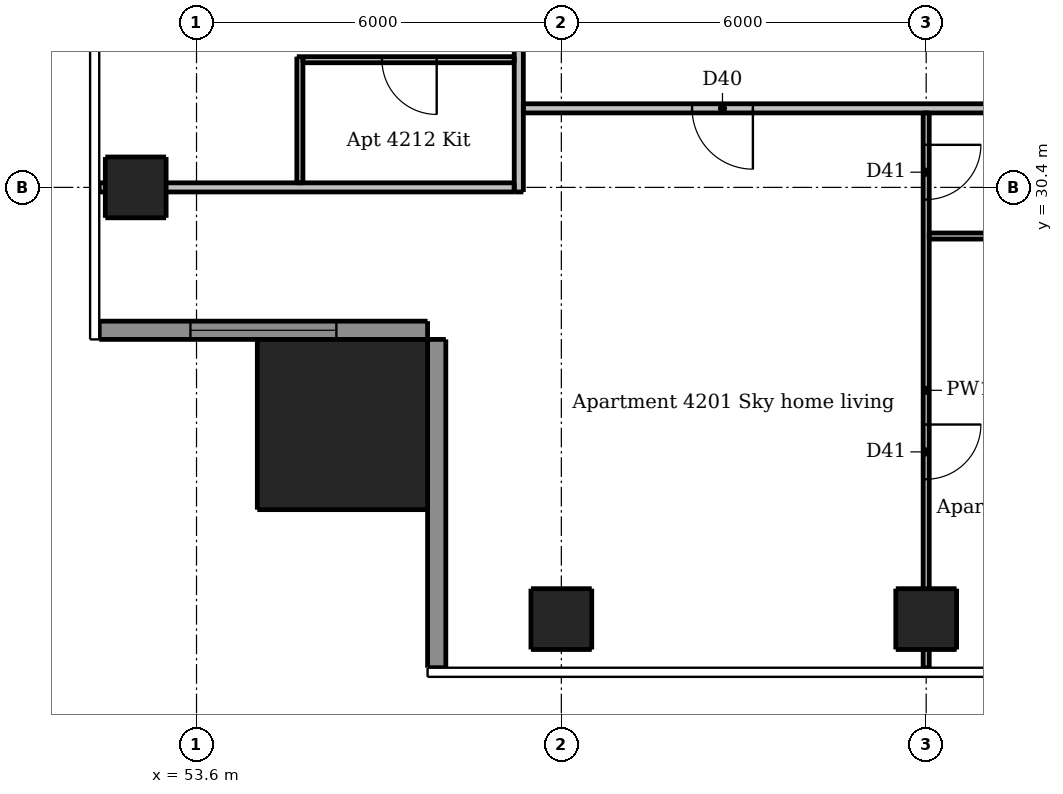
"""IFC4 building model, lengths in metres.
Left out: names, types, materials, properties, quantities, classifications, styles, units other than length and angle.
Written with IfcOpenShell. Run it as: python <this file> out.ifc"""

import sys

from ifc_helpers import new_model, si_unit, direction, frame, frame_2d, origin, origin_2d, place, context, subcontext, project, spatial, rectangle, extrude, element, fill, save


model = new_model("IFC4")
c1 = context("Model", 3, precision=1e-05, world=origin(), true_north=direction((0.0, 1.0)))
c2 = subcontext(c1, "Body", "Model", "MODEL_VIEW")
j1 = project(units=[si_unit("LENGTHUNIT", "METRE"), si_unit("PLANEANGLEUNIT", "RADIAN")], contexts=[c1])
p1 = place(None, origin())
s1 = spatial("IfcSite", under=j1, at=p1, CompositionType="ELEMENT")
p2 = place(p1, origin())
s2 = spatial("IfcBuilding", under=s1, at=p2, CompositionType="ELEMENT")
p3 = place(p2, frame((0.0, 0.0, 158.2)))
s3 = spatial("IfcBuildingStorey", under=s2, at=p3, CompositionType="ELEMENT", Elevation=158.2)
for number, where, z_axis, x_axis in (
    (1, (59.6, 23.3, 0.0), (0.0, 0.0, 1.0), (1.0, 0.0, 0.0)),
    (2, (65.6, 23.3, 0.0), (0.0, 0.0, 1.0), (1.0, 0.0, 0.0)),
    (3, (52.6, 30.4, 0.0), (0.0, 0.0, 1.0), (1.0, 0.0, 0.0)),
):
    element("IfcColumn", number, at=place(p3, frame(where, z_axis=z_axis, x_axis=x_axis)), inside=s3, PredefinedType="COLUMN", context=c2, shape_type="SweptSolid", body=[
        extrude(rectangle(XDim=1.0, YDim=1.0, at=origin_2d()), origin(), (0.0, 0.0, 1.0), 3.05),
    ])
p4 = place(p3, frame((56.0, 26.5, 0.0), z_axis=(0.0, 0.0, 1.0), x_axis=(1.0, 0.0, 0.0)))
e4 = element("IfcColumn", 4, at=p4, inside=s3, PredefinedType="COLUMN", context=c2, shape_type="SweptSolid", body=[
    extrude(rectangle(XDim=2.8, YDim=2.8, at=origin_2d()), origin(), (0.0, 0.0, 1.0), 3.3),
])
p5 = place(p3, frame((52.0, 28.05, 0.0), z_axis=(0.0, 0.0, 1.0), x_axis=(1.0, 0.0, 0.0)))
e5 = element("IfcWall", 5, at=p5, inside=s3, PredefinedType="SOLIDWALL", context=c2, shape_type="SweptSolid", body=[
    extrude(rectangle(XDim=5.4, YDim=0.3, at=frame_2d((2.7, 0.0))), origin(), (0.0, 0.0, 1.0), 3.05),
])
p6 = place(p5, frame((1.5, 0.0, 0.15)))
e6 = element("IfcOpeningElement", 6, at=p6, cuts=e5, PredefinedType="OPENING", context=c2, shape_type="SweptSolid", body=[
    extrude(rectangle(XDim=2.4, YDim=2.1, at=frame_2d((1.2, 1.05))), frame((0.0, 0.16, 0.0), z_axis=(0.0, -1.0, 0.0), x_axis=(1.0, 0.0, 0.0)), (0.0, 0.0, 1.0), 0.32),
])
p7 = place(p3, frame((57.55, 27.9, 0.0), z_axis=(0.0, 0.0, 1.0), x_axis=(0.0, -1.0, 0.0)))
e7 = element("IfcWall", 7, at=p7, inside=s3, PredefinedType="SOLIDWALL", context=c2, shape_type="SweptSolid", body=[
    extrude(rectangle(XDim=5.4, YDim=0.3, at=frame_2d((2.7, 0.0))), origin(), (0.0, 0.0, 1.0), 3.05),
])
p8 = place(p3, frame((55.3, 30.475, 0.0), z_axis=(0.0, 0.0, 1.0), x_axis=(0.0, 1.0, 0.0)))
e8 = element("IfcWall", 8, at=p8, inside=s3, PredefinedType="PARTITIONING", context=c2, shape_type="SweptSolid", body=[
    extrude(rectangle(XDim=2.075, YDim=0.1, at=frame_2d((1.038, 0.0))), origin(), (0.0, 0.0, 1.0), 3.05),
])
p9 = place(p3, frame((65.6, 31.625, 0.0), z_axis=(0.0, 0.0, 1.0), x_axis=(0.0, -1.0, 0.0)))
e9 = element("IfcWall", 9, at=p9, inside=s3, PredefinedType="PARTITIONING", context=c2, shape_type="SweptSolid", body=[
    extrude(rectangle(XDim=9.125, YDim=0.1, at=frame_2d((4.562, 0.0))), origin(), (0.0, 0.0, 1.0), 2.516),
])
p10 = place(p9, frame((0.525, 0.0, 0.0)))
e10 = element("IfcOpeningElement", 10, at=p10, cuts=e9, PredefinedType="OPENING", context=c2, shape_type="SweptSolid", body=[
    extrude(rectangle(XDim=0.9, YDim=2.1, at=frame_2d((0.45, 1.05))), frame((0.0, 0.06, 0.0), z_axis=(0.0, -1.0, 0.0), x_axis=(1.0, 0.0, 0.0)), (0.0, 0.0, 1.0), 0.12),
])
p11 = place(p9, frame((5.125, 0.0, 0.0)))
e11 = element("IfcOpeningElement", 11, at=p11, cuts=e9, PredefinedType="OPENING", context=c2, shape_type="SweptSolid", body=[
    extrude(rectangle(XDim=0.9, YDim=2.1, at=frame_2d((0.45, 1.05))), frame((0.0, 0.06, 0.0), z_axis=(0.0, -1.0, 0.0), x_axis=(1.0, 0.0, 0.0)), (0.0, 0.0, 1.0), 0.12),
])
p12 = place(p3, frame((58.825, 32.5, 0.0), z_axis=(0.0, 0.0, 1.0), x_axis=(-1.0, 0.0, 0.0)))
e12 = element("IfcWall", 12, at=p12, inside=s3, PredefinedType="PARTITIONING", context=c2, shape_type="SweptSolid", body=[
    extrude(rectangle(XDim=3.475, YDim=0.1, at=frame_2d((1.737, 0.0))), origin(), (0.0, 0.0, 1.0), 3.05),
])
p13 = place(p12, frame((1.275, 0.0, 0.0)))
e13 = element("IfcOpeningElement", 13, at=p13, cuts=e12, PredefinedType="OPENING", context=c2, shape_type="SweptSolid", body=[
    extrude(rectangle(XDim=0.9, YDim=2.1, at=frame_2d((0.45, 1.05))), frame((0.0, 0.06, 0.0), z_axis=(0.0, -1.0, 0.0), x_axis=(1.0, 0.0, 0.0)), (0.0, 0.0, 1.0), 0.12),
])
p14 = place(p3, frame((65.65, 29.6, 0.0), z_axis=(0.0, 0.0, 1.0), x_axis=(1.0, 0.0, 0.0)))
e14 = element("IfcWall", 14, at=p14, inside=s3, PredefinedType="PARTITIONING", context=c2, shape_type="SweptSolid", body=[
    extrude(rectangle(XDim=5.875, YDim=0.1, at=frame_2d((2.938, 0.0))), origin(), (0.0, 0.0, 1.0), 3.05),
])
p15 = place(p14, frame((3.75, 0.0, 0.0)))
e15 = element("IfcOpeningElement", 15, at=p15, cuts=e14, PredefinedType="OPENING", context=c2, shape_type="SweptSolid", body=[
    extrude(rectangle(XDim=0.8, YDim=2.1, at=frame_2d((0.4, 1.05))), frame((0.0, 0.06, 0.0), z_axis=(0.0, -1.0, 0.0), x_axis=(1.0, 0.0, 0.0)), (0.0, 0.0, 1.0), 0.12),
])
p16 = place(p3, frame((58.9, 30.325, 0.0), z_axis=(0.0, 0.0, 1.0), x_axis=(0.0, 1.0, 0.0)))
e16 = element("IfcWall", 16, at=p16, inside=s3, PredefinedType="PARTITIONING", context=c2, shape_type="SweptSolid", body=[
    extrude(rectangle(XDim=30.85, YDim=0.15, at=frame_2d((15.425, 0.0))), origin(), (0.0, 0.0, 1.0), 3.05),
])
p17 = place(p16, frame((2.575, 0.0, 0.0)))
e17 = element("IfcOpeningElement", 17, at=p17, cuts=e16, PredefinedType="OPENING", context=c2, shape_type="SweptSolid", body=[
    extrude(rectangle(XDim=1.0, YDim=2.1, at=frame_2d((0.5, 1.05))), frame((0.0, 0.085, 0.0), z_axis=(0.0, -1.0, 0.0), x_axis=(1.0, 0.0, 0.0)), (0.0, 0.0, 1.0), 0.17),
])
p18 = place(p16, frame((8.575, 0.0, 0.0)))
e18 = element("IfcOpeningElement", 18, at=p18, cuts=e16, PredefinedType="OPENING", context=c2, shape_type="SweptSolid", body=[
    extrude(rectangle(XDim=1.0, YDim=2.1, at=frame_2d((0.5, 1.05))), frame((0.0, 0.085, 0.0), z_axis=(0.0, -1.0, 0.0), x_axis=(1.0, 0.0, 0.0)), (0.0, 0.0, 1.0), 0.17),
])
p19 = place(p16, frame((14.575, 0.0, 0.0)))
e19 = element("IfcOpeningElement", 19, at=p19, cuts=e16, PredefinedType="OPENING", context=c2, shape_type="SweptSolid", body=[
    extrude(rectangle(XDim=1.0, YDim=2.1, at=frame_2d((0.5, 1.05))), frame((0.0, 0.085, 0.0), z_axis=(0.0, -1.0, 0.0), x_axis=(1.0, 0.0, 0.0)), (0.0, 0.0, 1.0), 0.17),
])
p20 = place(p16, frame((26.925, 0.0, 0.0)))
e20 = element("IfcOpeningElement", 20, at=p20, cuts=e16, PredefinedType="OPENING", context=c2, shape_type="SweptSolid", body=[
    extrude(rectangle(XDim=1.0, YDim=2.1, at=frame_2d((0.5, 1.05))), frame((0.0, 0.085, 0.0), z_axis=(0.0, -1.0, 0.0), x_axis=(1.0, 0.0, 0.0)), (0.0, 0.0, 1.0), 0.17),
])
p21 = place(p3, frame((89.525, 31.7, 0.0), z_axis=(0.0, 0.0, 1.0), x_axis=(-1.0, 0.0, 0.0)))
e21 = element("IfcWall", 21, at=p21, inside=s3, PredefinedType="PARTITIONING", context=c2, shape_type="SweptSolid", body=[
    extrude(rectangle(XDim=30.55, YDim=0.15, at=frame_2d((15.275, 0.0))), origin(), (0.0, 0.0, 1.0), 3.05),
])
p22 = place(p21, frame((26.775, 0.0, 0.0)))
e22 = element("IfcOpeningElement", 22, at=p22, cuts=e21, PredefinedType="OPENING", context=c2, shape_type="SweptSolid", body=[
    extrude(rectangle(XDim=1.0, YDim=2.1, at=frame_2d((0.5, 1.05))), frame((0.0, 0.085, 0.0), z_axis=(0.0, -1.0, 0.0), x_axis=(1.0, 0.0, 0.0)), (0.0, 0.0, 1.0), 0.17),
])
p23 = place(p21, frame((14.425, 0.0, 0.0)))
e23 = element("IfcOpeningElement", 23, at=p23, cuts=e21, PredefinedType="OPENING", context=c2, shape_type="SweptSolid", body=[
    extrude(rectangle(XDim=1.0, YDim=2.1, at=frame_2d((0.5, 1.05))), frame((0.0, 0.085, 0.0), z_axis=(0.0, -1.0, 0.0), x_axis=(1.0, 0.0, 0.0)), (0.0, 0.0, 1.0), 0.17),
])
p24 = place(p21, frame((6.575, 0.0, 0.0)))
e24 = element("IfcOpeningElement", 24, at=p24, cuts=e21, PredefinedType="OPENING", context=c2, shape_type="SweptSolid", body=[
    extrude(rectangle(XDim=1.0, YDim=2.1, at=frame_2d((0.5, 1.05))), frame((0.0, 0.085, 0.0), z_axis=(0.0, -1.0, 0.0), x_axis=(1.0, 0.0, 0.0)), (0.0, 0.0, 1.0), 0.17),
])
p25 = place(p3, frame((52.0, 30.4, 0.0), z_axis=(0.0, 0.0, 1.0), x_axis=(1.0, 0.0, 0.0)))
e25 = element("IfcWall", 25, at=p25, inside=s3, PredefinedType="PARTITIONING", context=c2, shape_type="SweptSolid", body=[
    extrude(rectangle(XDim=6.825, YDim=0.15, at=frame_2d((3.413, 0.0))), origin(), (0.0, 0.0, 1.0), 2.647),
])
p26 = place(p6, origin())
e26 = element("IfcWindow", 26, at=p26, inside=s3, PartitioningType="DOUBLE_PANEL_VERTICAL", PredefinedType="WINDOW", context=c2, shape_type="SweptSolid", body=[
    extrude(rectangle(XDim=2.4, YDim=2.1, at=frame_2d((1.2, 1.05))), frame((0.0, 0.03, 0.0), z_axis=(0.0, -1.0, 0.0), x_axis=(1.0, 0.0, 0.0)), (0.0, 0.0, 1.0), 0.06),
])
fill(e6, e26)
p27 = place(p22, origin())
e27 = element("IfcDoor", 27, at=p27, inside=s3, OperationType="SINGLE_SWING_LEFT", PredefinedType="DOOR", context=c2, shape_type="SweptSolid", body=[
    extrude(rectangle(XDim=1.0, YDim=2.1, at=frame_2d((0.5, 1.05))), frame((0.0, 0.025, 0.0), z_axis=(0.0, -1.0, 0.0), x_axis=(1.0, 0.0, 0.0)), (0.0, 0.0, 1.0), 0.05),
])
fill(e22, e27)
p28 = place(p10, origin())
e28 = element("IfcDoor", 28, at=p28, inside=s3, OperationType="SINGLE_SWING_LEFT", PredefinedType="DOOR", context=c2, shape_type="SweptSolid", body=[
    extrude(rectangle(XDim=0.9, YDim=2.1, at=frame_2d((0.45, 1.05))), frame((0.0, 0.025, 0.0), z_axis=(0.0, -1.0, 0.0), x_axis=(1.0, 0.0, 0.0)), (0.0, 0.0, 1.0), 0.05),
])
fill(e10, e28)
p29 = place(p11, origin())
e29 = element("IfcDoor", 29, at=p29, inside=s3, OperationType="SINGLE_SWING_LEFT", PredefinedType="DOOR", context=c2, shape_type="SweptSolid", body=[
    extrude(rectangle(XDim=0.9, YDim=2.1, at=frame_2d((0.45, 1.05))), frame((0.0, 0.025, 0.0), z_axis=(0.0, -1.0, 0.0), x_axis=(1.0, 0.0, 0.0)), (0.0, 0.0, 1.0), 0.05),
])
fill(e11, e29)
p30 = place(p13, origin())
e30 = element("IfcDoor", 30, at=p30, inside=s3, OperationType="SINGLE_SWING_LEFT", PredefinedType="DOOR", context=c2, shape_type="SweptSolid", body=[
    extrude(rectangle(XDim=0.9, YDim=2.1, at=frame_2d((0.45, 1.05))), frame((0.0, 0.025, 0.0), z_axis=(0.0, -1.0, 0.0), x_axis=(1.0, 0.0, 0.0)), (0.0, 0.0, 1.0), 0.05),
])
fill(e13, e30)
save(model, sys.argv[1])
